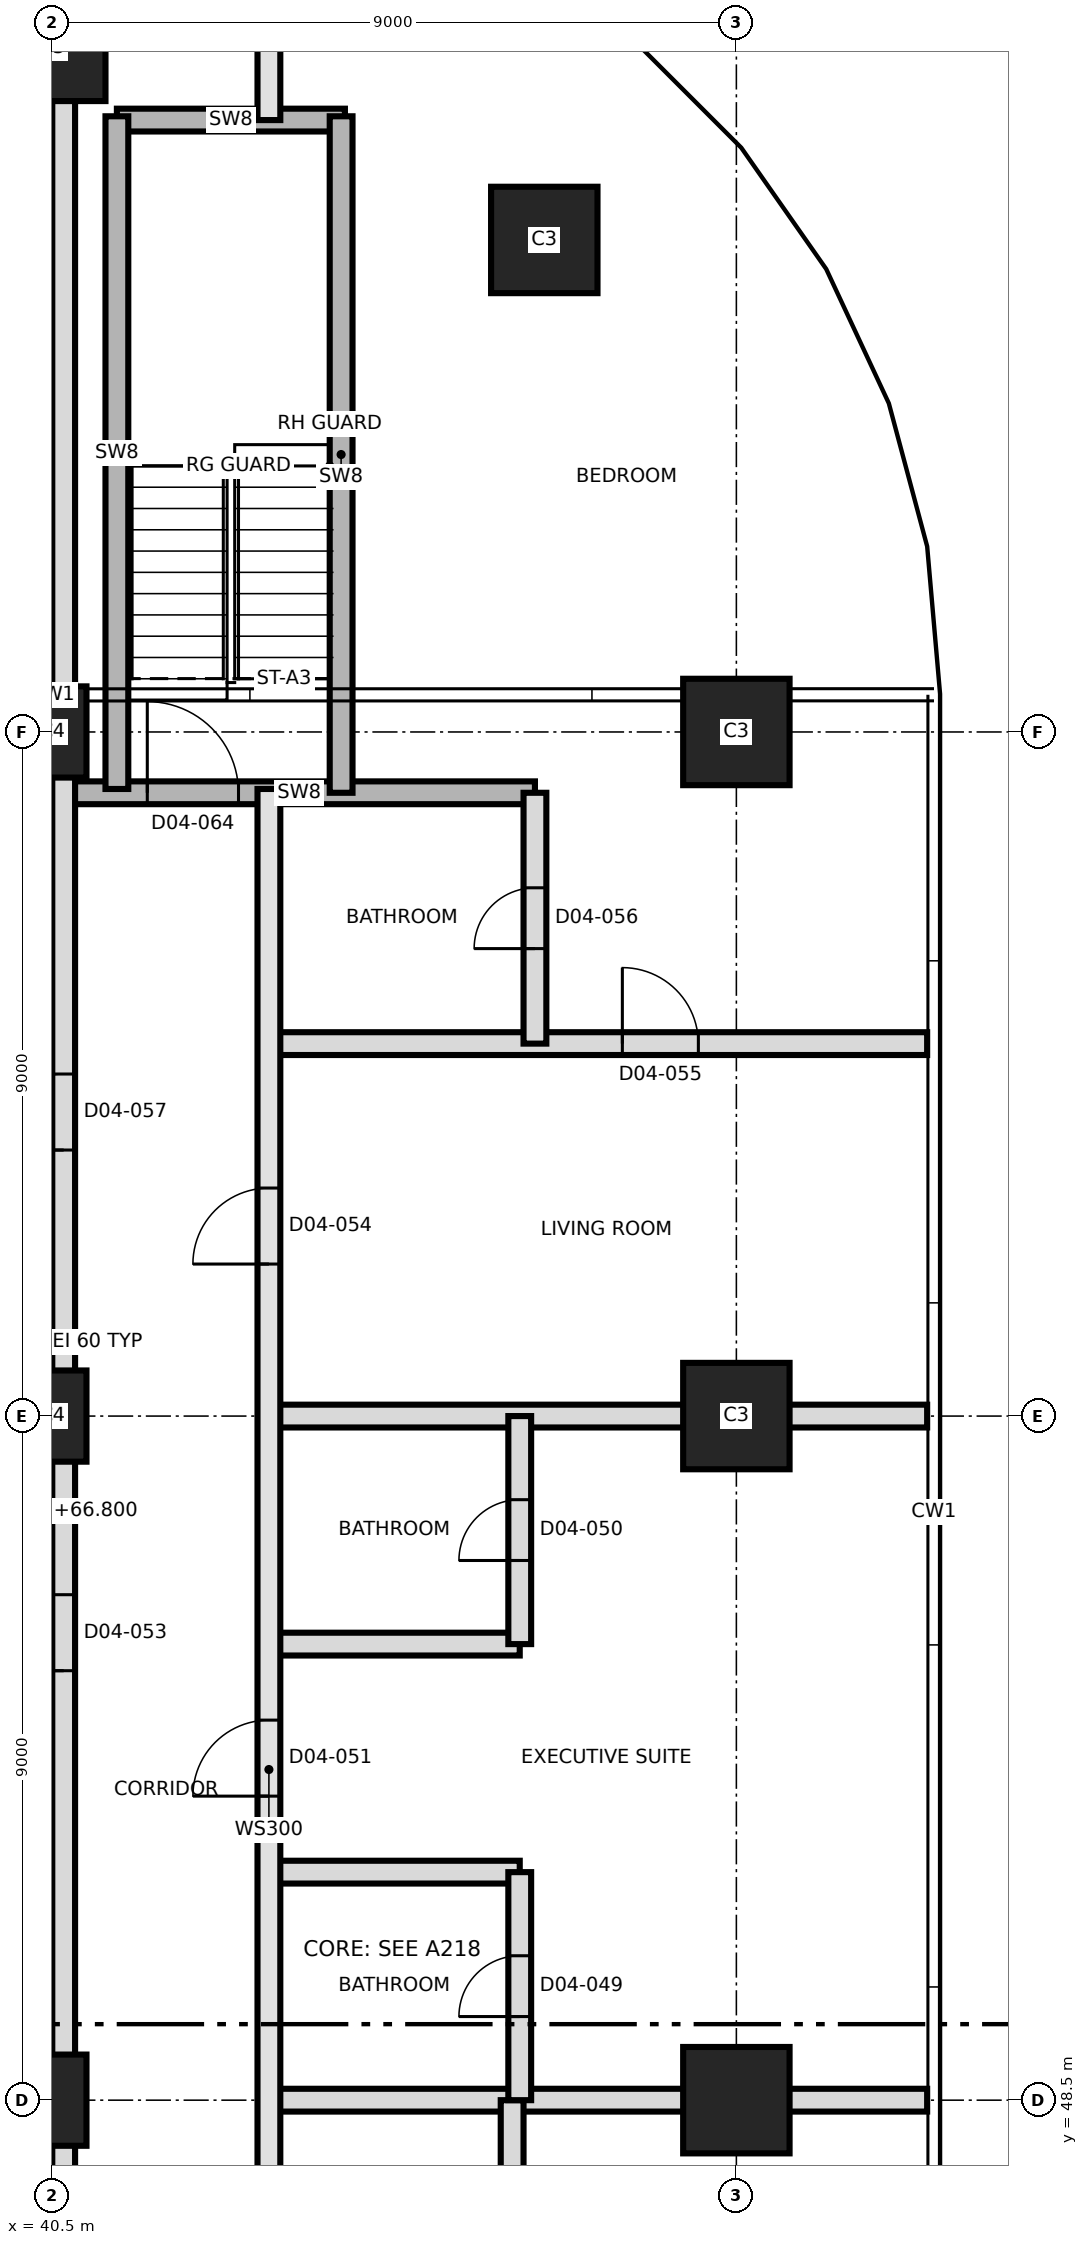
"""IFC4 building model, lengths in metres.
Left out: names, types, materials, properties, quantities, classifications, styles, units other than length and angle.
Written with IfcOpenShell. Run it as: python <this file> out.ifc"""

import sys

from ifc_helpers import new_model, si_unit, direction, frame, frame_2d, origin, origin_2d, place, context, subcontext, project, spatial, rectangle, extrude, element, fill, save


model = new_model("IFC4")
c1 = context("Model", 3, precision=1e-05, world=origin(), true_north=direction((0.0, 1.0)))
c2 = subcontext(c1, "Body", "Model", "MODEL_VIEW")
j1 = project(units=[si_unit("LENGTHUNIT", "METRE"), si_unit("PLANEANGLEUNIT", "RADIAN")], contexts=[c1])
p1 = place(None, origin())
s1 = spatial("IfcSite", under=j1, at=p1, CompositionType="ELEMENT")
p2 = place(p1, origin())
s2 = spatial("IfcBuilding", under=s1, at=p2, CompositionType="ELEMENT")
p3 = place(p2, frame((0.0, 0.0, 66.8)))
s3 = spatial("IfcBuildingStorey", under=s2, at=p3, CompositionType="ELEMENT", Elevation=66.8)
p4 = place(p3, frame((40.5, 48.5, 0.0), z_axis=(0.0, 0.0, 1.0), x_axis=(0.0, 1.0, 0.0)))
e1 = element("IfcColumn", 1, at=p4, inside=s3, PredefinedType="COLUMN", context=c2, shape_type="SweptSolid", body=[
    extrude(rectangle(XDim=1.2, YDim=0.9, at=origin_2d()), origin(), (0.0, 0.0, 1.0), 3.7),
])
p5 = place(p3, frame((49.5, 48.5, 0.0), z_axis=(0.0, 0.0, 1.0), x_axis=(1.0, 0.0, 0.0)))
e2 = element("IfcColumn", 2, at=p5, inside=s3, PredefinedType="COLUMN", context=c2, shape_type="SweptSolid", body=[
    extrude(rectangle(XDim=1.4, YDim=1.4, at=origin_2d()), origin(), (0.0, 0.0, 1.0), 3.7),
])
p6 = place(p3, frame((40.5, 57.5, 0.0), z_axis=(0.0, 0.0, 1.0), x_axis=(0.0, 1.0, 0.0)))
e3 = element("IfcColumn", 3, at=p6, inside=s3, PredefinedType="COLUMN", context=c2, shape_type="SweptSolid", body=[
    extrude(rectangle(XDim=1.2, YDim=0.9, at=origin_2d()), origin(), (0.0, 0.0, 1.0), 3.7),
])
p7 = place(p3, frame((49.5, 57.5, 0.0), z_axis=(0.0, 0.0, 1.0), x_axis=(1.0, 0.0, 0.0)))
e4 = element("IfcColumn", 4, at=p7, inside=s3, PredefinedType="COLUMN", context=c2, shape_type="SweptSolid", body=[
    extrude(rectangle(XDim=1.4, YDim=1.4, at=origin_2d()), origin(), (0.0, 0.0, 1.0), 3.7),
])
p8 = place(p3, frame((40.5, 66.5, 0.0), z_axis=(0.0, 0.0, 1.0), x_axis=(0.0, 1.0, 0.0)))
e5 = element("IfcColumn", 5, at=p8, inside=s3, PredefinedType="COLUMN", context=c2, shape_type="SweptSolid", body=[
    extrude(rectangle(XDim=1.2, YDim=0.9, at=origin_2d()), origin(), (0.0, 0.0, 1.0), 3.7),
])
for number, where, z_axis, x_axis in (
    (6, (49.5, 66.5, 0.0), (0.0, 0.0, 1.0), (1.0, 0.0, 0.0)),
    (7, (46.973, 72.973, 0.0), (0.0, 0.0, 1.0), (1.0, 0.0, 0.0)),
    (8, (40.5, 75.5, 0.0), (0.0, 0.0, 1.0), (1.0, 0.0, 0.0)),
):
    element("IfcColumn", number, at=place(p3, frame(where, z_axis=z_axis, x_axis=x_axis)), inside=s3, PredefinedType="COLUMN", context=c2, shape_type="SweptSolid", body=[
        extrude(rectangle(XDim=1.4, YDim=1.4, at=origin_2d()), origin(), (0.0, 0.0, 1.0), 3.7),
    ])
p9 = place(p3, frame((29.17, 48.5, 0.0), z_axis=(0.0, 0.0, 1.0), x_axis=(1.0, 0.0, 0.0)))
e9 = element("IfcWall", 9, at=p9, inside=s3, PredefinedType="PARTITIONING", context=c2, shape_type="SweptSolid", body=[
    extrude(rectangle(XDim=11.48, YDim=0.3, at=frame_2d((5.74, 0.0))), origin(), (0.0, 0.0, 1.0), 3.35),
])
p10 = place(p3, frame((43.35, 48.5, 0.0), z_axis=(0.0, 0.0, 1.0), x_axis=(1.0, 0.0, 0.0)))
e10 = element("IfcWall", 10, at=p10, inside=s3, PredefinedType="PARTITIONING", context=c2, shape_type="SweptSolid", body=[
    extrude(rectangle(XDim=8.66, YDim=0.3, at=frame_2d((4.33, 0.0))), origin(), (0.0, 0.0, 1.0), 3.35),
])
p11 = place(p3, frame((43.35, 51.5, 0.0), z_axis=(0.0, 0.0, 1.0), x_axis=(1.0, 0.0, 0.0)))
e11 = element("IfcWall", 11, at=p11, inside=s3, PredefinedType="PARTITIONING", context=c2, shape_type="SweptSolid", body=[
    extrude(rectangle(XDim=3.3, YDim=0.3, at=frame_2d((1.65, 0.0))), origin(), (0.0, 0.0, 1.0), 3.4),
])
p12 = place(p3, frame((37.15, 51.8, 0.0), z_axis=(0.0, 0.0, 1.0), x_axis=(1.0, 0.0, 0.0)))
e12 = element("IfcWall", 12, at=p12, inside=s3, PredefinedType="PARTITIONING", context=c2, shape_type="SweptSolid", body=[
    extrude(rectangle(XDim=3.5, YDim=0.3, at=frame_2d((1.75, 0.0))), origin(), (0.0, 0.0, 1.0), 3.4),
])
p13 = place(p3, frame((43.35, 54.5, 0.0), z_axis=(0.0, 0.0, 1.0), x_axis=(1.0, 0.0, 0.0)))
e13 = element("IfcWall", 13, at=p13, inside=s3, PredefinedType="PARTITIONING", context=c2, shape_type="SweptSolid", body=[
    extrude(rectangle(XDim=3.3, YDim=0.3, at=frame_2d((1.65, 0.0))), origin(), (0.0, 0.0, 1.0), 3.4),
])
p14 = place(p3, frame((29.17, 57.5, 0.0), z_axis=(0.0, 0.0, 1.0), x_axis=(1.0, 0.0, 0.0)))
e14 = element("IfcWall", 14, at=p14, inside=s3, PredefinedType="PARTITIONING", context=c2, shape_type="SweptSolid", body=[
    extrude(rectangle(XDim=11.48, YDim=0.3, at=frame_2d((5.74, 0.0))), origin(), (0.0, 0.0, 1.0), 3.35),
])
p15 = place(p3, frame((43.35, 57.5, 0.0), z_axis=(0.0, 0.0, 1.0), x_axis=(1.0, 0.0, 0.0)))
e15 = element("IfcWall", 15, at=p15, inside=s3, PredefinedType="PARTITIONING", context=c2, shape_type="SweptSolid", body=[
    extrude(rectangle(XDim=8.66, YDim=0.3, at=frame_2d((4.33, 0.0))), origin(), (0.0, 0.0, 1.0), 3.35),
])
p16 = place(p3, frame((43.35, 62.4, 0.0), z_axis=(0.0, 0.0, 1.0), x_axis=(1.0, 0.0, 0.0)))
e16 = element("IfcWall", 16, at=p16, inside=s3, PredefinedType="PARTITIONING", context=c2, shape_type="SweptSolid", body=[
    extrude(rectangle(XDim=8.66, YDim=0.3, at=frame_2d((4.33, 0.0))), origin(), (0.0, 0.0, 1.0), 3.35),
])
p17 = place(p16, frame((4.65, 0.0, 0.0)))
e17 = element("IfcOpeningElement", 17, at=p17, cuts=e16, PredefinedType="OPENING", context=c2, shape_type="SweptSolid", body=[
    extrude(rectangle(XDim=1.0, YDim=2.1, at=frame_2d((0.5, 1.05))), frame((0.0, 0.16, 0.0), z_axis=(0.0, -1.0, 0.0), x_axis=(1.0, 0.0, 0.0)), (0.0, 0.0, 1.0), 0.32),
])
p18 = place(p3, frame((40.65, 65.7, 0.0), z_axis=(0.0, 0.0, 1.0), x_axis=(1.0, 0.0, 0.0)))
e18 = element("IfcWall", 18, at=p18, inside=s3, PredefinedType="SHEAR", context=c2, shape_type="SweptSolid", body=[
    extrude(rectangle(XDim=6.2, YDim=0.3, at=frame_2d((3.1, 0.0))), origin(), (0.0, 0.0, 1.0), 3.4),
])
p19 = place(p18, frame((1.1, 0.0, 0.0)))
e19 = element("IfcOpeningElement", 19, at=p19, cuts=e18, PredefinedType="OPENING", context=c2, shape_type="SweptSolid", body=[
    extrude(rectangle(XDim=1.2, YDim=2.1, at=frame_2d((0.6, 1.05))), frame((0.0, 0.16, 0.0), z_axis=(0.0, -1.0, 0.0), x_axis=(1.0, 0.0, 0.0)), (0.0, 0.0, 1.0), 0.32),
])
p20 = place(p3, frame((29.333, 69.8, 0.0), z_axis=(0.0, 0.0, 1.0), x_axis=(1.0, 0.0, 0.0)))
e20 = element("IfcWall", 20, at=p20, inside=s3, PredefinedType="PARTITIONING", context=c2, shape_type="SweptSolid", body=[
    extrude(rectangle(XDim=11.317, YDim=0.3, at=frame_2d((5.658, 0.0))), origin(), (0.0, 0.0, 1.0), 3.35),
])
p21 = place(p20, frame((5.667, 0.0, 0.0)))
e21 = element("IfcOpeningElement", 21, at=p21, cuts=e20, PredefinedType="OPENING", context=c2, shape_type="SweptSolid", body=[
    extrude(rectangle(XDim=1.0, YDim=2.1, at=frame_2d((0.5, 1.05))), frame((0.0, 0.16, 0.0), z_axis=(0.0, -1.0, 0.0), x_axis=(1.0, 0.0, 0.0)), (0.0, 0.0, 1.0), 0.32),
])
p22 = place(p3, frame((37.15, 73.1, 0.0), z_axis=(0.0, 0.0, 1.0), x_axis=(1.0, 0.0, 0.0)))
e22 = element("IfcWall", 22, at=p22, inside=s3, PredefinedType="PARTITIONING", context=c2, shape_type="SweptSolid", body=[
    extrude(rectangle(XDim=3.5, YDim=0.3, at=frame_2d((1.75, 0.0))), origin(), (0.0, 0.0, 1.0), 3.4),
])
p23 = place(p3, frame((41.35, 74.55, 0.0), z_axis=(0.0, 0.0, 1.0), x_axis=(1.0, 0.0, 0.0)))
e23 = element("IfcWall", 23, at=p23, inside=s3, PredefinedType="SHEAR", context=c2, shape_type="SweptSolid", body=[
    extrude(rectangle(XDim=3.0, YDim=0.3, at=frame_2d((1.5, 0.0))), origin(), (0.0, 0.0, 1.0), 3.4),
])
p24 = place(p3, frame((40.65, 39.95, 0.0), z_axis=(0.0, 0.0, 1.0), x_axis=(0.0, 1.0, 0.0)))
e24 = element("IfcWall", 24, at=p24, inside=s3, PredefinedType="PARTITIONING", context=c2, shape_type="SweptSolid", body=[
    extrude(rectangle(XDim=37.05, YDim=0.3, at=frame_2d((18.525, 0.0))), origin(), (0.0, 0.0, 1.0), 3.35),
])
p25 = place(p24, frame((0.58, 0.0, 0.0)))
e25 = element("IfcOpeningElement", 25, at=p25, cuts=e24, PredefinedType="OPENING", context=c2, shape_type="SweptSolid", body=[
    extrude(rectangle(XDim=1.0, YDim=2.1, at=frame_2d((0.5, 1.05))), frame((0.0, 0.16, 0.0), z_axis=(0.0, -1.0, 0.0), x_axis=(1.0, 0.0, 0.0)), (0.0, 0.0, 1.0), 0.32),
])
p26 = place(p24, frame((6.43, 0.0, 0.0)))
e26 = element("IfcOpeningElement", 26, at=p26, cuts=e24, PredefinedType="OPENING", context=c2, shape_type="SweptSolid", body=[
    extrude(rectangle(XDim=1.0, YDim=2.1, at=frame_2d((0.5, 1.05))), frame((0.0, 0.16, 0.0), z_axis=(0.0, -1.0, 0.0), x_axis=(1.0, 0.0, 0.0)), (0.0, 0.0, 1.0), 0.32),
])
p27 = place(p24, frame((14.2, 0.0, 0.0)))
e27 = element("IfcOpeningElement", 27, at=p27, cuts=e24, PredefinedType="OPENING", context=c2, shape_type="SweptSolid", body=[
    extrude(rectangle(XDim=1.0, YDim=2.4, at=frame_2d((0.5, 1.2))), frame((0.0, 0.16, 0.0), z_axis=(0.0, -1.0, 0.0), x_axis=(1.0, 0.0, 0.0)), (0.0, 0.0, 1.0), 0.32),
])
p28 = place(p24, frame((21.05, 0.0, 0.0)))
e28 = element("IfcOpeningElement", 28, at=p28, cuts=e24, PredefinedType="OPENING", context=c2, shape_type="SweptSolid", body=[
    extrude(rectangle(XDim=1.0, YDim=2.4, at=frame_2d((0.5, 1.2))), frame((0.0, 0.16, 0.0), z_axis=(0.0, -1.0, 0.0), x_axis=(1.0, 0.0, 0.0)), (0.0, 0.0, 1.0), 0.32),
])
p29 = place(p3, frame((41.35, 65.75, 0.0), z_axis=(0.0, 0.0, 1.0), x_axis=(0.0, 1.0, 0.0)))
e29 = element("IfcWall", 29, at=p29, inside=s3, PredefinedType="SHEAR", context=c2, shape_type="SweptSolid", body=[
    extrude(rectangle(XDim=8.85, YDim=0.3, at=frame_2d((4.425, 0.0))), origin(), (0.0, 0.0, 1.0), 3.4),
])
p30 = place(p3, frame((43.35, 39.95, 0.0), z_axis=(0.0, 0.0, 1.0), x_axis=(0.0, 1.0, 0.0)))
e30 = element("IfcWall", 30, at=p30, inside=s3, PredefinedType="SOLIDWALL", context=c2, shape_type="SweptSolid", body=[
    extrude(rectangle(XDim=25.8, YDim=0.3, at=frame_2d((12.9, 0.0))), origin(), (0.0, 0.0, 1.0), 3.4),
])
p31 = place(p30, frame((2.47, 0.0, 0.0)))
e31 = element("IfcOpeningElement", 31, at=p31, cuts=e30, PredefinedType="OPENING", context=c2, shape_type="SweptSolid", body=[
    extrude(rectangle(XDim=1.0, YDim=2.1, at=frame_2d((0.5, 1.05))), frame((0.0, 0.16, 0.0), z_axis=(0.0, -1.0, 0.0), x_axis=(1.0, 0.0, 0.0)), (0.0, 0.0, 1.0), 0.32),
])
p32 = place(p30, frame((4.27, 0.0, 0.0)))
e32 = element("IfcOpeningElement", 32, at=p32, cuts=e30, PredefinedType="OPENING", context=c2, shape_type="SweptSolid", body=[
    extrude(rectangle(XDim=1.0, YDim=2.1, at=frame_2d((0.5, 1.05))), frame((0.0, 0.16, 0.0), z_axis=(0.0, -1.0, 0.0), x_axis=(1.0, 0.0, 0.0)), (0.0, 0.0, 1.0), 0.32),
])
p33 = place(p30, frame((12.55, 0.0, 0.0)))
e33 = element("IfcOpeningElement", 33, at=p33, cuts=e30, PredefinedType="OPENING", context=c2, shape_type="SweptSolid", body=[
    extrude(rectangle(XDim=1.0, YDim=2.4, at=frame_2d((0.5, 1.2))), frame((0.0, 0.16, 0.0), z_axis=(0.0, -1.0, 0.0), x_axis=(1.0, 0.0, 0.0)), (0.0, 0.0, 1.0), 0.32),
])
p34 = place(p30, frame((19.55, 0.0, 0.0)))
e34 = element("IfcOpeningElement", 34, at=p34, cuts=e30, PredefinedType="OPENING", context=c2, shape_type="SweptSolid", body=[
    extrude(rectangle(XDim=1.0, YDim=2.4, at=frame_2d((0.5, 1.2))), frame((0.0, 0.16, 0.0), z_axis=(0.0, -1.0, 0.0), x_axis=(1.0, 0.0, 0.0)), (0.0, 0.0, 1.0), 0.32),
])
p35 = place(p3, frame((43.35, 74.55, 0.0), z_axis=(0.0, 0.0, 1.0), x_axis=(0.0, 1.0, 0.0)))
e35 = element("IfcWall", 35, at=p35, inside=s3, PredefinedType="SOLIDWALL", context=c2, shape_type="SweptSolid", body=[
    extrude(rectangle(XDim=2.45, YDim=0.3, at=frame_2d((1.225, 0.0))), origin(), (0.0, 0.0, 1.0), 3.35),
])
p36 = place(p3, frame((44.3, 65.7, 0.0), z_axis=(0.0, 0.0, 1.0), x_axis=(0.0, 1.0, 0.0)))
e36 = element("IfcWall", 36, at=p36, inside=s3, PredefinedType="SHEAR", context=c2, shape_type="SweptSolid", body=[
    extrude(rectangle(XDim=8.9, YDim=0.3, at=frame_2d((4.45, 0.0))), origin(), (0.0, 0.0, 1.0), 3.4),
])
p37 = place(p3, frame((46.55, 45.8, 0.0), z_axis=(0.0, 0.0, 1.0), x_axis=(0.0, 1.0, 0.0)))
e37 = element("IfcWall", 37, at=p37, inside=s3, PredefinedType="PARTITIONING", context=c2, shape_type="SweptSolid", body=[
    extrude(rectangle(XDim=2.7, YDim=0.3, at=frame_2d((1.35, 0.0))), origin(), (0.0, 0.0, 1.0), 3.4),
])
p38 = place(p37, frame((0.95, 0.0, 0.0)))
e38 = element("IfcOpeningElement", 38, at=p38, cuts=e37, PredefinedType="OPENING", context=c2, shape_type="SweptSolid", body=[
    extrude(rectangle(XDim=0.8, YDim=2.1, at=frame_2d((0.4, 1.05))), frame((0.0, 0.16, 0.0), z_axis=(0.0, -1.0, 0.0), x_axis=(1.0, 0.0, 0.0)), (0.0, 0.0, 1.0), 0.32),
])
p39 = place(p3, frame((46.65, 48.5, 0.0), z_axis=(0.0, 0.0, 1.0), x_axis=(0.0, 1.0, 0.0)))
e39 = element("IfcWall", 39, at=p39, inside=s3, PredefinedType="PARTITIONING", context=c2, shape_type="SweptSolid", body=[
    extrude(rectangle(XDim=3.0, YDim=0.3, at=frame_2d((1.5, 0.0))), origin(), (0.0, 0.0, 1.0), 3.4),
])
p40 = place(p39, frame((1.1, 0.0, 0.0)))
e40 = element("IfcOpeningElement", 40, at=p40, cuts=e39, PredefinedType="OPENING", context=c2, shape_type="SweptSolid", body=[
    extrude(rectangle(XDim=0.8, YDim=2.1, at=frame_2d((0.4, 1.05))), frame((0.0, 0.16, 0.0), z_axis=(0.0, -1.0, 0.0), x_axis=(1.0, 0.0, 0.0)), (0.0, 0.0, 1.0), 0.32),
])
p41 = place(p3, frame((46.65, 54.5, 0.0), z_axis=(0.0, 0.0, 1.0), x_axis=(0.0, 1.0, 0.0)))
e41 = element("IfcWall", 41, at=p41, inside=s3, PredefinedType="PARTITIONING", context=c2, shape_type="SweptSolid", body=[
    extrude(rectangle(XDim=3.0, YDim=0.3, at=frame_2d((1.5, 0.0))), origin(), (0.0, 0.0, 1.0), 3.4),
])
p42 = place(p41, frame((1.1, 0.0, 0.0)))
e42 = element("IfcOpeningElement", 42, at=p42, cuts=e41, PredefinedType="OPENING", context=c2, shape_type="SweptSolid", body=[
    extrude(rectangle(XDim=0.8, YDim=2.1, at=frame_2d((0.4, 1.05))), frame((0.0, 0.16, 0.0), z_axis=(0.0, -1.0, 0.0), x_axis=(1.0, 0.0, 0.0)), (0.0, 0.0, 1.0), 0.32),
])
p43 = place(p3, frame((46.85, 62.4, 0.0), z_axis=(0.0, 0.0, 1.0), x_axis=(0.0, 1.0, 0.0)))
e43 = element("IfcWall", 43, at=p43, inside=s3, PredefinedType="PARTITIONING", context=c2, shape_type="SweptSolid", body=[
    extrude(rectangle(XDim=3.3, YDim=0.3, at=frame_2d((1.65, 0.0))), origin(), (0.0, 0.0, 1.0), 3.4),
])
p44 = place(p43, frame((1.25, 0.0, 0.0)))
e44 = element("IfcOpeningElement", 44, at=p44, cuts=e43, PredefinedType="OPENING", context=c2, shape_type="SweptSolid", body=[
    extrude(rectangle(XDim=0.8, YDim=2.1, at=frame_2d((0.4, 1.05))), frame((0.0, 0.16, 0.0), z_axis=(0.0, -1.0, 0.0), x_axis=(1.0, 0.0, 0.0)), (0.0, 0.0, 1.0), 0.32),
])
p45 = place(p40, origin())
e45 = element("IfcDoor", 45, at=p45, inside=s3, OperationType="SINGLE_SWING_LEFT", PredefinedType="DOOR", context=c2, shape_type="SweptSolid", body=[
    extrude(rectangle(XDim=0.8, YDim=2.1, at=frame_2d((0.4, 1.05))), frame((0.0, 0.025, 0.0), z_axis=(0.0, -1.0, 0.0), x_axis=(1.0, 0.0, 0.0)), (0.0, 0.0, 1.0), 0.05),
])
fill(e40, e45)
p46 = place(p42, origin())
e46 = element("IfcDoor", 46, at=p46, inside=s3, OperationType="SINGLE_SWING_LEFT", PredefinedType="DOOR", context=c2, shape_type="SweptSolid", body=[
    extrude(rectangle(XDim=0.8, YDim=2.1, at=frame_2d((0.4, 1.05))), frame((0.0, 0.025, 0.0), z_axis=(0.0, -1.0, 0.0), x_axis=(1.0, 0.0, 0.0)), (0.0, 0.0, 1.0), 0.05),
])
fill(e42, e46)
p47 = place(p33, origin())
e47 = element("IfcDoor", 47, at=p47, inside=s3, OperationType="SINGLE_SWING_RIGHT", PredefinedType="DOOR", context=c2, shape_type="SweptSolid", body=[
    extrude(rectangle(XDim=1.0, YDim=2.4, at=frame_2d((0.5, 1.2))), frame((0.0, 0.025, 0.0), z_axis=(0.0, -1.0, 0.0), x_axis=(1.0, 0.0, 0.0)), (0.0, 0.0, 1.0), 0.05),
])
fill(e33, e47)
p48 = place(p27, origin())
e48 = element("IfcDoor", 48, at=p48, inside=s3, OperationType="SINGLE_SWING_RIGHT", PredefinedType="DOOR", context=c2, shape_type="SweptSolid", body=[
    extrude(rectangle(XDim=1.0, YDim=2.4, at=frame_2d((0.5, 1.2))), frame((0.0, 0.025, 0.0), z_axis=(0.0, -1.0, 0.0), x_axis=(1.0, 0.0, 0.0)), (0.0, 0.0, 1.0), 0.05),
])
fill(e27, e48)
p49 = place(p34, origin())
e49 = element("IfcDoor", 49, at=p49, inside=s3, OperationType="SINGLE_SWING_LEFT", PredefinedType="DOOR", context=c2, shape_type="SweptSolid", body=[
    extrude(rectangle(XDim=1.0, YDim=2.4, at=frame_2d((0.5, 1.2))), frame((0.0, 0.025, 0.0), z_axis=(0.0, -1.0, 0.0), x_axis=(1.0, 0.0, 0.0)), (0.0, 0.0, 1.0), 0.05),
])
fill(e34, e49)
p50 = place(p17, origin())
e50 = element("IfcDoor", 50, at=p50, inside=s3, OperationType="SINGLE_SWING_RIGHT", PredefinedType="DOOR", context=c2, shape_type="SweptSolid", body=[
    extrude(rectangle(XDim=1.0, YDim=2.1, at=frame_2d((0.5, 1.05))), frame((0.0, 0.025, 0.0), z_axis=(0.0, -1.0, 0.0), x_axis=(1.0, 0.0, 0.0)), (0.0, 0.0, 1.0), 0.05),
])
fill(e17, e50)
p51 = place(p44, origin())
e51 = element("IfcDoor", 51, at=p51, inside=s3, OperationType="SINGLE_SWING_LEFT", PredefinedType="DOOR", context=c2, shape_type="SweptSolid", body=[
    extrude(rectangle(XDim=0.8, YDim=2.1, at=frame_2d((0.4, 1.05))), frame((0.0, 0.025, 0.0), z_axis=(0.0, -1.0, 0.0), x_axis=(1.0, 0.0, 0.0)), (0.0, 0.0, 1.0), 0.05),
])
fill(e44, e51)
p52 = place(p28, origin())
e52 = element("IfcDoor", 52, at=p52, inside=s3, OperationType="SINGLE_SWING_LEFT", PredefinedType="DOOR", context=c2, shape_type="SweptSolid", body=[
    extrude(rectangle(XDim=1.0, YDim=2.4, at=frame_2d((0.5, 1.2))), frame((0.0, 0.025, 0.0), z_axis=(0.0, -1.0, 0.0), x_axis=(1.0, 0.0, 0.0)), (0.0, 0.0, 1.0), 0.05),
])
fill(e28, e52)
p53 = place(p19, origin())
e53 = element("IfcDoor", 53, at=p53, inside=s3, OperationType="SINGLE_SWING_RIGHT", PredefinedType="DOOR", context=c2, shape_type="SweptSolid", body=[
    extrude(rectangle(XDim=1.2, YDim=2.1, at=frame_2d((0.6, 1.05))), frame((0.0, 0.025, 0.0), z_axis=(0.0, -1.0, 0.0), x_axis=(1.0, 0.0, 0.0)), (0.0, 0.0, 1.0), 0.05),
])
fill(e19, e53)
save(model, sys.argv[1])
